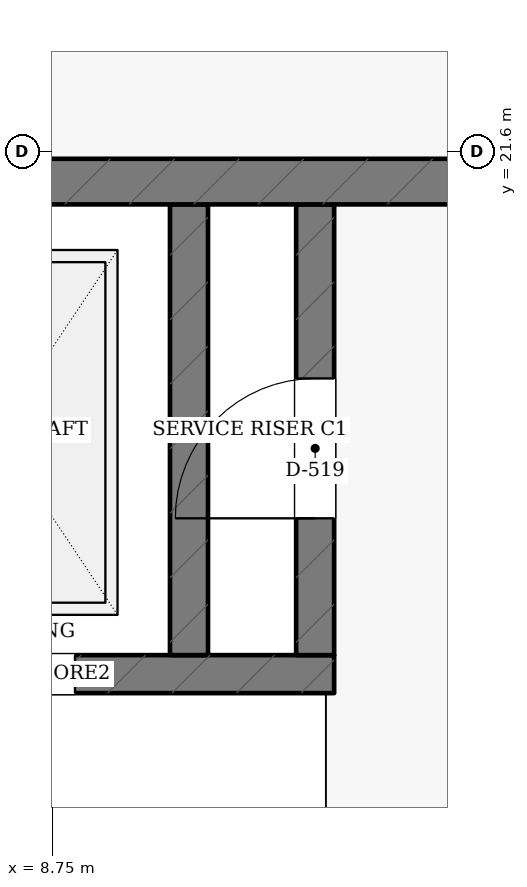
"""IFC4 building model, lengths in metres.
Left out: names, types, materials, properties, quantities, classifications, styles, units other than length and angle.
Written with IfcOpenShell. Run it as: python <this file> out.ifc"""

import sys

from ifc_helpers import new_model, si_unit, direction, frame, frame_2d, origin, place, context, subcontext, project, spatial, rectangle, extrude, element, fill, save


model = new_model("IFC4")
c1 = context("Model", 3, precision=1e-05, world=origin(), true_north=direction((0.0, 1.0)))
c2 = subcontext(c1, "Body", "Model", "MODEL_VIEW")
j1 = project(units=[si_unit("LENGTHUNIT", "METRE"), si_unit("PLANEANGLEUNIT", "RADIAN")], contexts=[c1])
p1 = place(None, origin())
s1 = spatial("IfcSite", under=j1, at=p1, CompositionType="ELEMENT")
p2 = place(p1, origin())
s2 = spatial("IfcBuilding", under=s1, at=p2, CompositionType="ELEMENT")
p3 = place(p2, frame((0.0, 0.0, 18.9)))
s3 = spatial("IfcBuildingStorey", under=s2, at=p3, CompositionType="ELEMENT", Elevation=18.9)
p4 = place(p3, frame((7.025, 18.16, 0.0), z_axis=(0.0, 0.0, 1.0), x_axis=(1.0, 0.0, 0.0)))
e1 = element("IfcWall", 1, at=p4, inside=s3, PredefinedType="SHEAR", context=c2, shape_type="SweptSolid", body=[
    extrude(rectangle(XDim=3.58, YDim=0.25, at=frame_2d((1.79, 0.0))), origin(), (0.0, 0.0, 1.0), 3.65),
])
p5 = place(p4, frame((0.775, 0.0, 0.0)))
e2 = element("IfcOpeningElement", 2, at=p5, cuts=e1, PredefinedType="OPENING", context=c2, shape_type="SweptSolid", body=[
    extrude(rectangle(XDim=1.1, YDim=2.15, at=frame_2d((0.55, 1.075))), frame((0.0, 0.135, 0.0), z_axis=(0.0, -1.0, 0.0), x_axis=(1.0, 0.0, 0.0)), (0.0, 0.0, 1.0), 0.27),
])
p6 = place(p3, frame((9.65, 18.285, 0.0), z_axis=(0.0, 0.0, 1.0), x_axis=(0.0, 1.0, 0.0)))
e3 = element("IfcWall", 3, at=p6, inside=s3, PredefinedType="SHEAR", context=c2, shape_type="SweptSolid", body=[
    extrude(rectangle(XDim=2.965, YDim=0.25, at=frame_2d((1.482, 0.0))), origin(), (0.0, 0.0, 1.0), 3.65),
])
p7 = place(p3, frame((10.48, 18.285, 0.0), z_axis=(0.0, 0.0, 1.0), x_axis=(0.0, 1.0, 0.0)))
e4 = element("IfcWall", 4, at=p7, inside=s3, PredefinedType="SHEAR", context=c2, shape_type="SweptSolid", body=[
    extrude(rectangle(XDim=2.965, YDim=0.25, at=frame_2d((1.482, 0.0))), origin(), (0.0, 0.0, 1.0), 3.65),
])
p8 = place(p7, frame((0.9, 0.0, 0.0)))
e5 = element("IfcOpeningElement", 5, at=p8, cuts=e4, PredefinedType="OPENING", context=c2, shape_type="SweptSolid", body=[
    extrude(rectangle(XDim=0.92, YDim=2.05, at=frame_2d((0.46, 1.025))), frame((0.0, 0.135, 0.0), z_axis=(0.0, -1.0, 0.0), x_axis=(1.0, 0.0, 0.0)), (0.0, 0.0, 1.0), 0.27),
])
p9 = place(p3, frame((0.17, 21.4, 0.0), z_axis=(0.0, 0.0, 1.0), x_axis=(1.0, 0.0, 0.0)))
e6 = element("IfcWall", 6, at=p9, inside=s3, PredefinedType="SHEAR", context=c2, shape_type="SweptSolid", body=[
    extrude(rectangle(XDim=14.23, YDim=0.3, at=frame_2d((7.115, 0.0))), origin(), (0.0, 0.0, 1.0), 3.65),
])
p10 = place(p5, origin())
e7 = element("IfcDoor", 7, at=p10, inside=s3, OperationType="SLIDING_TO_LEFT", PredefinedType="DOOR", context=c2, shape_type="SweptSolid", body=[
    extrude(rectangle(XDim=1.1, YDim=2.15, at=frame_2d((0.55, 1.075))), frame((0.0, 0.025, 0.0), z_axis=(0.0, -1.0, 0.0), x_axis=(1.0, 0.0, 0.0)), (0.0, 0.0, 1.0), 0.05),
])
fill(e2, e7)
p11 = place(p8, origin())
e8 = element("IfcDoor", 8, at=p11, inside=s3, OperationType="SINGLE_SWING_LEFT", PredefinedType="DOOR", context=c2, shape_type="SweptSolid", body=[
    extrude(rectangle(XDim=0.92, YDim=2.05, at=frame_2d((0.46, 1.025))), frame((0.0, 0.025, 0.0), z_axis=(0.0, -1.0, 0.0), x_axis=(1.0, 0.0, 0.0)), (0.0, 0.0, 1.0), 0.05),
])
fill(e5, e8)
save(model, sys.argv[1])
